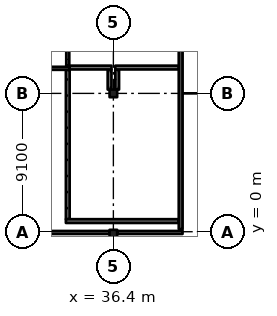
"""IFC4 building model, lengths in metres.
Left out: names, types, materials, properties, quantities, classifications, styles, units other than length and angle.
Written with IfcOpenShell. Run it as: python <this file> out.ifc"""

import sys

from ifc_helpers import new_model, si_unit, direction, frame, frame_2d, origin, origin_2d, place, context, subcontext, project, spatial, rectangle, extrude, element, fill, save


model = new_model("IFC4")
c1 = context("Model", 3, precision=1e-05, world=origin(), true_north=direction((0.0, 1.0)))
c2 = subcontext(c1, "Body", "Model", "MODEL_VIEW")
j1 = project(units=[si_unit("LENGTHUNIT", "METRE"), si_unit("PLANEANGLEUNIT", "RADIAN")], contexts=[c1])
p1 = place(None, origin())
s1 = spatial("IfcSite", under=j1, at=p1, CompositionType="ELEMENT")
p2 = place(p1, origin())
s2 = spatial("IfcBuilding", under=s1, at=p2, CompositionType="ELEMENT")
p3 = place(p2, frame((0.0, 0.0, 29.12)))
s3 = spatial("IfcBuildingStorey", under=s2, at=p3, CompositionType="ELEMENT", Elevation=29.12)
for number, where, z_axis, x_axis in (
    (1, (36.4, -0.125, 0.0), (0.0, 0.0, 1.0), (1.0, 0.0, 0.0)),
    (2, (36.4, 9.1, 0.0), (0.0, 0.0, 1.0), (1.0, 0.0, 0.0)),
):
    element("IfcColumn", number, at=place(p3, frame(where, z_axis=z_axis, x_axis=x_axis)), inside=s3, PredefinedType="COLUMN", context=c2, shape_type="SweptSolid", body=[
        extrude(rectangle(XDim=0.5, YDim=0.5, at=origin_2d()), origin(), (0.0, 0.0, 1.0), 4.55),
    ])
p4 = place(p3, frame((40.825, 40.95, 0.0), z_axis=(0.0, 0.0, 1.0), x_axis=(0.0, -1.0, 0.0)))
e3 = element("IfcWall", 3, at=p4, inside=s3, PredefinedType="SHEAR", context=c2, shape_type="SweptSolid", body=[
    extrude(rectangle(XDim=40.775, YDim=0.25, at=frame_2d((20.387, 0.0))), origin(), (0.0, 0.0, 1.0), 4.55),
])
p5 = place(p3, frame((27.55, -0.05, 0.0), z_axis=(0.0, 0.0, 1.0), x_axis=(1.0, 0.0, 0.0)))
e4 = element("IfcWall", 4, at=p5, inside=s3, PredefinedType="SOLIDWALL", context=c2, shape_type="SweptSolid", body=[
    extrude(rectangle(XDim=8.6, YDim=0.2, at=frame_2d((4.3, 0.0))), origin(), (0.0, 0.0, 1.0), 4.5),
])
p6 = place(p5, frame((0.65, 0.0, 0.6)))
e5 = element("IfcOpeningElement", 5, at=p6, cuts=e4, PredefinedType="OPENING", context=c2, shape_type="SweptSolid", body=[
    extrude(rectangle(XDim=3.0, YDim=3.0, at=frame_2d((1.5, 1.5))), frame((0.0, 0.11, 0.0), z_axis=(0.0, -1.0, 0.0), x_axis=(1.0, 0.0, 0.0)), (0.0, 0.0, 1.0), 0.22),
])
p7 = place(p5, frame((4.95, 0.0, 0.6)))
e6 = element("IfcOpeningElement", 6, at=p7, cuts=e4, PredefinedType="OPENING", context=c2, shape_type="SweptSolid", body=[
    extrude(rectangle(XDim=3.0, YDim=3.0, at=frame_2d((1.5, 1.5))), frame((0.0, 0.11, 0.0), z_axis=(0.0, -1.0, 0.0), x_axis=(1.0, 0.0, 0.0)), (0.0, 0.0, 1.0), 0.22),
])
p8 = place(p3, frame((36.65, -0.05, 0.0), z_axis=(0.0, 0.0, 1.0), x_axis=(1.0, 0.0, 0.0)))
e7 = element("IfcWall", 7, at=p8, inside=s3, PredefinedType="SOLIDWALL", context=c2, shape_type="SweptSolid", body=[
    extrude(rectangle(XDim=4.3, YDim=0.2, at=frame_2d((2.15, 0.0))), origin(), (0.0, 0.0, 1.0), 4.5),
])
p9 = place(p8, frame((0.65, 0.0, 0.6)))
e8 = element("IfcOpeningElement", 8, at=p9, cuts=e7, PredefinedType="OPENING", context=c2, shape_type="SweptSolid", body=[
    extrude(rectangle(XDim=3.0, YDim=3.0, at=frame_2d((1.5, 1.5))), frame((0.0, 0.11, 0.0), z_axis=(0.0, -1.0, 0.0), x_axis=(1.0, 0.0, 0.0)), (0.0, 0.0, 1.0), 0.22),
])
p10 = place(p3, frame((33.4, 0.825, 0.0), z_axis=(0.0, 0.0, 1.0), x_axis=(0.0, 1.0, 0.0)))
e9 = element("IfcWall", 9, at=p10, inside=s3, PredefinedType="SOLIDWALL", context=c2, shape_type="SweptSolid", body=[
    extrude(rectangle(XDim=9.825, YDim=0.25, at=frame_2d((4.913, 0.0))), origin(), (0.0, 0.0, 1.0), 3.88),
])
p11 = place(p3, frame((33.4, 10.925, 0.0), z_axis=(0.0, 0.0, 1.0), x_axis=(0.0, 1.0, 0.0)))
e10 = element("IfcWall", 10, at=p11, inside=s3, PredefinedType="PARTITIONING", context=c2, shape_type="SweptSolid", body=[
    extrude(rectangle(XDim=2.775, YDim=0.2, at=frame_2d((1.387, 0.0))), origin(), (0.0, 0.0, 1.0), 3.88),
])
p12 = place(p11, frame((0.45, 0.0, 0.0)))
e11 = element("IfcOpeningElement", 11, at=p12, cuts=e10, PredefinedType="OPENING", context=c2, shape_type="SweptSolid", body=[
    extrude(rectangle(XDim=1.8, YDim=2.4, at=frame_2d((0.9, 1.2))), frame((0.0, 0.11, 0.0), z_axis=(0.0, -1.0, 0.0), x_axis=(1.0, 0.0, 0.0)), (0.0, 0.0, 1.0), 0.22),
])
p13 = place(p3, frame((33.525, 10.75, 0.0), z_axis=(0.0, 0.0, 1.0), x_axis=(-1.0, 0.0, 0.0)))
e12 = element("IfcWall", 12, at=p13, inside=s3, PredefinedType="PARTITIONING", context=c2, shape_type="SweptSolid", body=[
    extrude(rectangle(XDim=5.562, YDim=0.2, at=frame_2d((2.781, 0.0))), origin(), (0.0, 0.0, 1.0), 3.88),
])
p14 = place(p3, frame((36.15, 9.35, 0.0), z_axis=(0.0, 0.0, 1.0), x_axis=(0.0, 1.0, 0.0)))
e13 = element("IfcWall", 13, at=p14, inside=s3, PredefinedType="SOLIDWALL", context=c2, shape_type="SweptSolid", body=[
    extrude(rectangle(XDim=1.325, YDim=0.25, at=frame_2d((0.663, 0.0))), origin(), (0.0, 0.0, 1.0), 3.88),
])
p15 = place(p3, frame((36.275, 10.8, 0.0), z_axis=(0.0, 0.0, 1.0), x_axis=(-1.0, 0.0, 0.0)))
e14 = element("IfcWall", 14, at=p15, inside=s3, PredefinedType="SOLIDWALL", context=c2, shape_type="SweptSolid", body=[
    extrude(rectangle(XDim=2.975, YDim=0.25, at=frame_2d((1.487, 0.0))), origin(), (0.0, 0.0, 1.0), 3.88),
])
p16 = place(p3, frame((36.65, 10.675, 0.0), z_axis=(0.0, 0.0, 1.0), x_axis=(0.0, -1.0, 0.0)))
e15 = element("IfcWall", 15, at=p16, inside=s3, PredefinedType="SOLIDWALL", context=c2, shape_type="SweptSolid", body=[
    extrude(rectangle(XDim=1.325, YDim=0.25, at=frame_2d((0.663, 0.0))), origin(), (0.0, 0.0, 1.0), 3.88),
])
p17 = place(p3, frame((40.7, 0.7, 0.0), z_axis=(0.0, 0.0, 1.0), x_axis=(-1.0, 0.0, 0.0)))
e16 = element("IfcWall", 16, at=p17, inside=s3, PredefinedType="SOLIDWALL", context=c2, shape_type="SweptSolid", body=[
    extrude(rectangle(XDim=7.425, YDim=0.25, at=frame_2d((3.712, 0.0))), origin(), (0.0, 0.0, 1.0), 3.88),
])
p18 = place(p3, frame((40.7, 10.8, 0.0), z_axis=(0.0, 0.0, 1.0), x_axis=(-1.0, 0.0, 0.0)))
e17 = element("IfcWall", 17, at=p18, inside=s3, PredefinedType="SOLIDWALL", context=c2, shape_type="SweptSolid", body=[
    extrude(rectangle(XDim=4.175, YDim=0.25, at=frame_2d((2.087, 0.0))), origin(), (0.0, 0.0, 1.0), 3.88),
])
p19 = place(p18, frame((1.55, 0.0, 0.0)))
e18 = element("IfcOpeningElement", 18, at=p19, cuts=e17, PredefinedType="OPENING", context=c2, shape_type="SweptSolid", body=[
    extrude(rectangle(XDim=1.0, YDim=2.1, at=frame_2d((0.5, 1.05))), frame((0.0, 0.135, 0.0), z_axis=(0.0, -1.0, 0.0), x_axis=(1.0, 0.0, 0.0)), (0.0, 0.0, 1.0), 0.27),
])
p20 = place(p7, origin())
e19 = element("IfcWindow", 19, at=p20, inside=s3, PartitioningType="SINGLE_PANEL", PredefinedType="WINDOW", context=c2, shape_type="SweptSolid", body=[
    extrude(rectangle(XDim=3.0, YDim=3.0, at=frame_2d((1.5, 1.5))), frame((0.0, 0.03, 0.0), z_axis=(0.0, -1.0, 0.0), x_axis=(1.0, 0.0, 0.0)), (0.0, 0.0, 1.0), 0.06),
])
fill(e6, e19)
p21 = place(p9, origin())
e20 = element("IfcWindow", 20, at=p21, inside=s3, PartitioningType="SINGLE_PANEL", PredefinedType="WINDOW", context=c2, shape_type="SweptSolid", body=[
    extrude(rectangle(XDim=3.0, YDim=3.0, at=frame_2d((1.5, 1.5))), frame((0.0, 0.03, 0.0), z_axis=(0.0, -1.0, 0.0), x_axis=(1.0, 0.0, 0.0)), (0.0, 0.0, 1.0), 0.06),
])
fill(e8, e20)
p22 = place(p19, origin())
e21 = element("IfcDoor", 21, at=p22, inside=s3, OperationType="SINGLE_SWING_RIGHT", PredefinedType="DOOR", context=c2, shape_type="SweptSolid", body=[
    extrude(rectangle(XDim=1.0, YDim=2.1, at=frame_2d((0.5, 1.05))), frame((0.0, 0.025, 0.0), z_axis=(0.0, -1.0, 0.0), x_axis=(1.0, 0.0, 0.0)), (0.0, 0.0, 1.0), 0.05),
])
fill(e18, e21)
p23 = place(p12, origin())
e22 = element("IfcDoor", 22, at=p23, inside=s3, OperationType="DOUBLE_DOOR_SINGLE_SWING", PredefinedType="DOOR", context=c2, shape_type="SweptSolid", body=[
    extrude(rectangle(XDim=1.8, YDim=2.4, at=frame_2d((0.9, 1.2))), frame((0.0, 0.025, 0.0), z_axis=(0.0, -1.0, 0.0), x_axis=(1.0, 0.0, 0.0)), (0.0, 0.0, 1.0), 0.05),
])
fill(e11, e22)
save(model, sys.argv[1])
